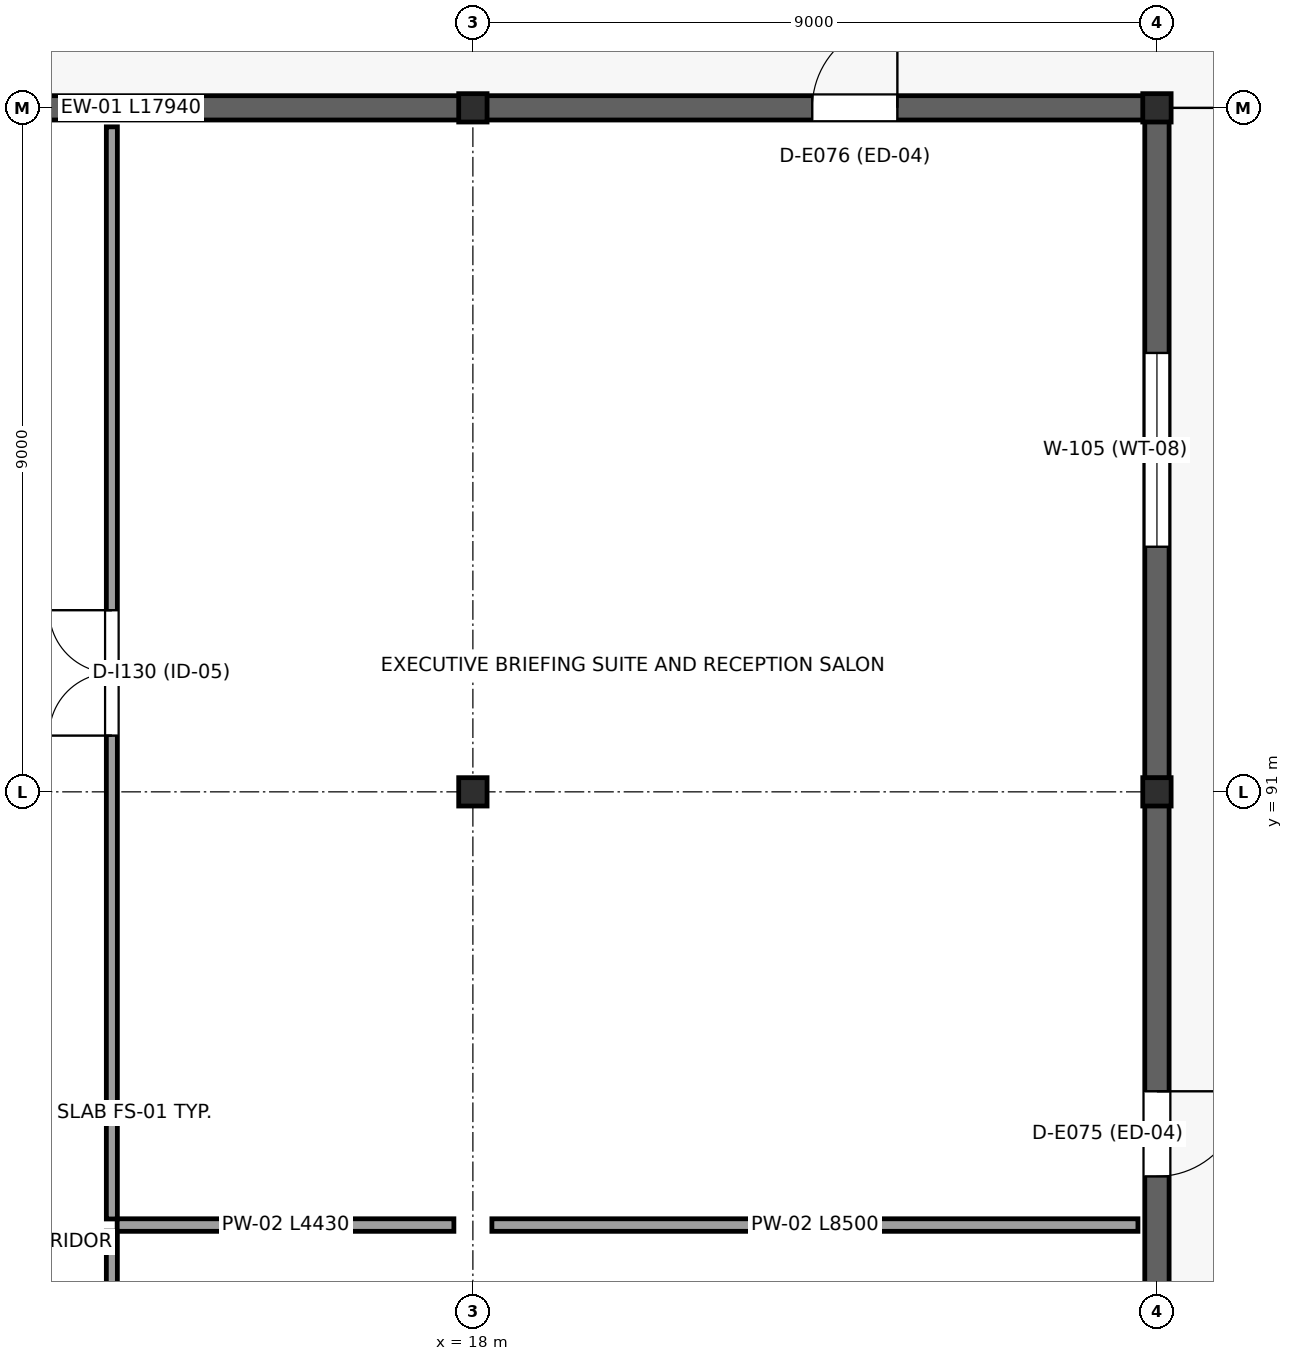
"""IFC4 building model, lengths in metres.
Left out: names, types, materials, properties, quantities, classifications, styles, units other than length and angle.
Written with IfcOpenShell. Run it as: python <this file> out.ifc"""

import sys

from ifc_helpers import new_model, si_unit, direction, frame, frame_2d, origin, origin_2d, place, context, subcontext, project, spatial, rectangle, i_section, extrude, element, fill, save


model = new_model("IFC4")
c1 = context("Model", 3, precision=1e-05, world=origin(), true_north=direction((0.0, 1.0)))
c2 = subcontext(c1, "Body", "Model", "MODEL_VIEW")
j1 = project(units=[si_unit("LENGTHUNIT", "METRE"), si_unit("PLANEANGLEUNIT", "RADIAN")], contexts=[c1])
p1 = place(None, origin())
s1 = spatial("IfcSite", under=j1, at=p1, CompositionType="ELEMENT")
p2 = place(p1, origin())
s2 = spatial("IfcBuilding", under=s1, at=p2, CompositionType="ELEMENT")
p3 = place(p2, frame((0.0, 0.0, 21.0)))
s3 = spatial("IfcBuildingStorey", under=s2, at=p3, CompositionType="ELEMENT", Elevation=21.0)
for number, where, z_axis, x_axis in (
    (1, (18.0, 91.0, 0.0), (0.0, 0.0, 1.0), (1.0, 0.0, 0.0)),
    (2, (18.0, 100.0, 0.0), (0.0, 0.0, 1.0), (1.0, 0.0, 0.0)),
    (3, (27.0, 91.0, 0.0), (0.0, 0.0, 1.0), (1.0, 0.0, 0.0)),
    (4, (27.0, 100.0, 0.0), (0.0, 0.0, 1.0), (1.0, 0.0, 0.0)),
):
    element("IfcColumn", number, at=place(p3, frame(where, z_axis=z_axis, x_axis=x_axis)), inside=s3, PredefinedType="COLUMN", context=c2, shape_type="SweptSolid", body=[
        extrude(i_section(OverallWidth=0.373, OverallDepth=0.373, WebThickness=0.016, FlangeThickness=0.026, at=origin_2d()), origin(), (0.0, 0.0, 1.0), 4.5),
    ])
p4 = place(p3, frame((27.0, 90.82, 0.0), z_axis=(0.0, 0.0, 1.0), x_axis=(0.0, -1.0, 0.0)))
e5 = element("IfcWall", 5, at=p4, inside=s3, PredefinedType="STANDARD", context=c2, shape_type="SweptSolid", body=[
    extrude(rectangle(XDim=8.64, YDim=0.32, at=frame_2d((4.32, 0.0))), origin(), (0.0, 0.0, 1.0), 4.29),
])
p5 = place(p4, frame((3.76, 0.0, 0.0)))
e6 = element("IfcOpeningElement", 6, at=p5, cuts=e5, PredefinedType="OPENING", context=c2, shape_type="SweptSolid", body=[
    extrude(rectangle(XDim=1.12, YDim=2.24, at=frame_2d((0.56, 1.12))), frame((0.0, 0.17, 0.0), z_axis=(0.0, -1.0, 0.0), x_axis=(1.0, 0.0, 0.0)), (0.0, 0.0, 1.0), 0.34),
])
p6 = place(p3, frame((27.0, 99.82, 0.0), z_axis=(0.0, 0.0, 1.0), x_axis=(0.0, -1.0, 0.0)))
e7 = element("IfcWall", 7, at=p6, inside=s3, PredefinedType="STANDARD", context=c2, shape_type="SweptSolid", body=[
    extrude(rectangle(XDim=8.64, YDim=0.32, at=frame_2d((4.32, 0.0))), origin(), (0.0, 0.0, 1.0), 4.29),
])
p7 = place(p6, frame((3.045, 0.0, 1.0)))
e8 = element("IfcOpeningElement", 8, at=p7, cuts=e7, PredefinedType="OPENING", context=c2, shape_type="SweptSolid", body=[
    extrude(rectangle(XDim=2.55, YDim=2.4, at=frame_2d((1.275, 1.2))), frame((0.0, 0.17, 0.0), z_axis=(0.0, -1.0, 0.0), x_axis=(1.0, 0.0, 0.0)), (0.0, 0.0, 1.0), 0.34),
])
p8 = place(p3, frame((9.015, 100.0, 0.0), z_axis=(0.0, 0.0, 1.0), x_axis=(1.0, 0.0, 0.0)))
e9 = element("IfcWall", 9, at=p8, inside=s3, PredefinedType="STANDARD", context=c2, shape_type="SweptSolid", body=[
    extrude(rectangle(XDim=8.97, YDim=0.32, at=frame_2d((4.485, 0.0))), origin(), (0.0, 0.0, 1.0), 4.29),
])
p9 = place(p3, frame((18.015, 100.0, 0.0), z_axis=(0.0, 0.0, 1.0), x_axis=(1.0, 0.0, 0.0)))
e10 = element("IfcWall", 10, at=p9, inside=s3, PredefinedType="STANDARD", context=c2, shape_type="SweptSolid", body=[
    extrude(rectangle(XDim=8.97, YDim=0.32, at=frame_2d((4.485, 0.0))), origin(), (0.0, 0.0, 1.0), 4.29),
])
p10 = place(p9, frame((4.45, 0.0, 0.0)))
e11 = element("IfcOpeningElement", 11, at=p10, cuts=e10, PredefinedType="OPENING", context=c2, shape_type="SweptSolid", body=[
    extrude(rectangle(XDim=1.12, YDim=2.24, at=frame_2d((0.56, 1.12))), frame((0.0, 0.17, 0.0), z_axis=(0.0, -1.0, 0.0), x_axis=(1.0, 0.0, 0.0)), (0.0, 0.0, 1.0), 0.34),
])
p11 = place(p3, frame((13.25, 70.38, 0.0), z_axis=(0.0, 0.0, 1.0), x_axis=(0.0, 1.0, 0.0)))
e12 = element("IfcWall", 12, at=p11, inside=s3, PredefinedType="PARTITIONING", context=c2, shape_type="SweptSolid", body=[
    extrude(rectangle(XDim=14.84, YDim=0.145, at=frame_2d((7.42, 0.0))), origin(), (0.0, 0.0, 1.0), 3.5),
])
p12 = place(p11, frame((6.595, 0.0, 0.0)))
e13 = element("IfcOpeningElement", 13, at=p12, cuts=e12, PredefinedType="OPENING", context=c2, shape_type="SweptSolid", body=[
    extrude(rectangle(XDim=1.65, YDim=2.25, at=frame_2d((0.825, 1.125))), frame((0.0, 0.083, 0.0), z_axis=(0.0, -1.0, 0.0), x_axis=(1.0, 0.0, 0.0)), (0.0, 0.0, 1.0), 0.165),
])
p13 = place(p3, frame((13.25, 85.38, 0.0), z_axis=(0.0, 0.0, 1.0), x_axis=(0.0, 1.0, 0.0)))
e14 = element("IfcWall", 14, at=p13, inside=s3, PredefinedType="PARTITIONING", context=c2, shape_type="SweptSolid", body=[
    extrude(rectangle(XDim=14.37, YDim=0.145, at=frame_2d((7.185, 0.0))), origin(), (0.0, 0.0, 1.0), 3.5),
])
p14 = place(p13, frame((6.36, 0.0, 0.0)))
e15 = element("IfcOpeningElement", 15, at=p14, cuts=e14, PredefinedType="OPENING", context=c2, shape_type="SweptSolid", body=[
    extrude(rectangle(XDim=1.65, YDim=2.25, at=frame_2d((0.825, 1.125))), frame((0.0, 0.083, 0.0), z_axis=(0.0, -1.0, 0.0), x_axis=(1.0, 0.0, 0.0)), (0.0, 0.0, 1.0), 0.165),
])
p15 = place(p3, frame((13.32, 85.3, 0.0), z_axis=(0.0, 0.0, 1.0), x_axis=(1.0, 0.0, 0.0)))
e16 = element("IfcWall", 16, at=p15, inside=s3, PredefinedType="PARTITIONING", context=c2, shape_type="SweptSolid", body=[
    extrude(rectangle(XDim=4.43, YDim=0.165, at=frame_2d((2.215, 0.0))), origin(), (0.0, 0.0, 1.0), 3.5),
])
p16 = place(p3, frame((18.25, 85.3, 0.0), z_axis=(0.0, 0.0, 1.0), x_axis=(1.0, 0.0, 0.0)))
e17 = element("IfcWall", 17, at=p16, inside=s3, PredefinedType="PARTITIONING", context=c2, shape_type="SweptSolid", body=[
    extrude(rectangle(XDim=8.5, YDim=0.165, at=frame_2d((4.25, 0.0))), origin(), (0.0, 0.0, 1.0), 3.5),
])
p17 = place(p5, origin())
e18 = element("IfcDoor", 18, at=p17, inside=s3, OperationType="SINGLE_SWING_LEFT", PredefinedType="DOOR", context=c2, shape_type="SweptSolid", body=[
    extrude(rectangle(XDim=1.12, YDim=2.24, at=frame_2d((0.56, 1.12))), frame((0.0, 0.025, 0.0), z_axis=(0.0, -1.0, 0.0), x_axis=(1.0, 0.0, 0.0)), (0.0, 0.0, 1.0), 0.05),
])
fill(e6, e18)
p18 = place(p7, origin())
e19 = element("IfcWindow", 19, at=p18, inside=s3, PartitioningType="SINGLE_PANEL", PredefinedType="WINDOW", context=c2, shape_type="SweptSolid", body=[
    extrude(rectangle(XDim=2.55, YDim=2.4, at=frame_2d((1.275, 1.2))), frame((0.0, 0.03, 0.0), z_axis=(0.0, -1.0, 0.0), x_axis=(1.0, 0.0, 0.0)), (0.0, 0.0, 1.0), 0.06),
])
fill(e8, e19)
p19 = place(p10, origin())
e20 = element("IfcDoor", 20, at=p19, inside=s3, OperationType="SINGLE_SWING_RIGHT", PredefinedType="DOOR", context=c2, shape_type="SweptSolid", body=[
    extrude(rectangle(XDim=1.12, YDim=2.24, at=frame_2d((0.56, 1.12))), frame((0.0, 0.025, 0.0), z_axis=(0.0, -1.0, 0.0), x_axis=(1.0, 0.0, 0.0)), (0.0, 0.0, 1.0), 0.05),
])
fill(e11, e20)
p20 = place(p14, origin())
e21 = element("IfcDoor", 21, at=p20, inside=s3, OperationType="DOUBLE_DOOR_SINGLE_SWING", PredefinedType="DOOR", context=c2, shape_type="SweptSolid", body=[
    extrude(rectangle(XDim=1.65, YDim=2.25, at=frame_2d((0.825, 1.125))), frame((0.0, 0.025, 0.0), z_axis=(0.0, -1.0, 0.0), x_axis=(1.0, 0.0, 0.0)), (0.0, 0.0, 1.0), 0.05),
])
fill(e15, e21)
save(model, sys.argv[1])
